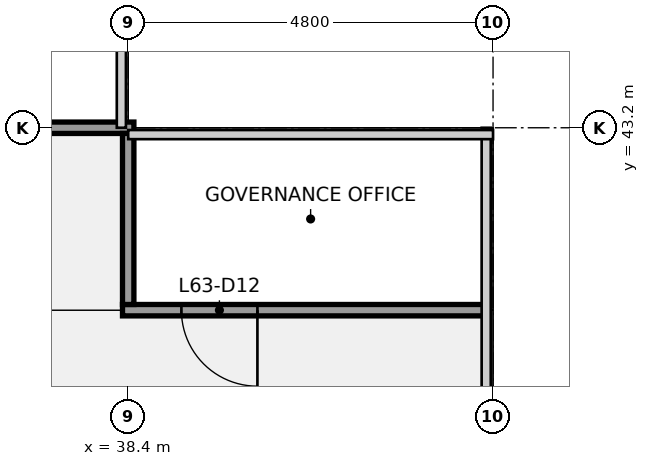
"""IFC4 building model, lengths in metres.
Left out: names, types, materials, properties, quantities, classifications, styles, units other than length and angle.
Written with IfcOpenShell. Run it as: python <this file> out.ifc"""

import sys

from ifc_helpers import new_model, si_unit, direction, frame, frame_2d, origin, place, context, subcontext, project, spatial, rectangle, extrude, element, fill, save


model = new_model("IFC4")
c1 = context("Model", 3, precision=1e-05, world=origin(), true_north=direction((0.0, 1.0)))
c2 = subcontext(c1, "Body", "Model", "MODEL_VIEW")
j1 = project(units=[si_unit("LENGTHUNIT", "METRE"), si_unit("PLANEANGLEUNIT", "RADIAN")], contexts=[c1])
p1 = place(None, origin())
s1 = spatial("IfcSite", under=j1, at=p1, CompositionType="ELEMENT")
p2 = place(p1, origin())
s2 = spatial("IfcBuilding", under=s1, at=p2, CompositionType="ELEMENT")
p3 = place(p2, frame((0.0, 0.0, 290.3)))
s3 = spatial("IfcBuildingStorey", under=s2, at=p3, CompositionType="ELEMENT", Elevation=290.3)
p4 = place(p3, frame((38.325, 40.8, 0.0), z_axis=(0.0, 0.0, 1.0), x_axis=(1.0, 0.0, 0.0)))
e1 = element("IfcWall", 1, at=p4, inside=s3, PredefinedType="PARTITIONING", context=c2, shape_type="SweptSolid", body=[
    extrude(rectangle(XDim=4.775, YDim=0.15, at=frame_2d((2.388, 0.0))), origin(), (0.0, 0.0, 1.0), 2.87),
])
p5 = place(p4, frame((0.775, 0.0, 0.0)))
e2 = element("IfcOpeningElement", 2, at=p5, cuts=e1, PredefinedType="OPENING", context=c2, shape_type="SweptSolid", body=[
    extrude(rectangle(XDim=1.0, YDim=2.1, at=frame_2d((0.5, 1.05))), frame((0.0, 0.085, 0.0), z_axis=(0.0, -1.0, 0.0), x_axis=(1.0, 0.0, 0.0)), (0.0, 0.0, 1.0), 0.17),
])
p6 = place(p3, frame((19.125, 43.2, 0.0), z_axis=(0.0, 0.0, 1.0), x_axis=(1.0, 0.0, 0.0)))
e3 = element("IfcWall", 3, at=p6, inside=s3, PredefinedType="PARTITIONING", context=c2, shape_type="SweptSolid", body=[
    extrude(rectangle(XDim=19.35, YDim=0.15, at=frame_2d((9.675, 0.0))), origin(), (0.0, 0.0, 1.0), 2.87),
])
p7 = place(p6, frame((0.775, 0.0, 0.0)))
e4 = element("IfcOpeningElement", 4, at=p7, cuts=e3, PredefinedType="OPENING", context=c2, shape_type="SweptSolid", body=[
    extrude(rectangle(XDim=1.0, YDim=2.1, at=frame_2d((0.5, 1.05))), frame((0.0, 0.085, 0.0), z_axis=(0.0, -1.0, 0.0), x_axis=(1.0, 0.0, 0.0)), (0.0, 0.0, 1.0), 0.17),
])
p8 = place(p6, frame((4.375, 0.0, 0.0)))
e5 = element("IfcOpeningElement", 5, at=p8, cuts=e3, PredefinedType="OPENING", context=c2, shape_type="SweptSolid", body=[
    extrude(rectangle(XDim=1.0, YDim=2.1, at=frame_2d((0.5, 1.05))), frame((0.0, 0.085, 0.0), z_axis=(0.0, -1.0, 0.0), x_axis=(1.0, 0.0, 0.0)), (0.0, 0.0, 1.0), 0.17),
])
p9 = place(p6, frame((12.775, 0.0, 0.0)))
e6 = element("IfcOpeningElement", 6, at=p9, cuts=e3, PredefinedType="OPENING", context=c2, shape_type="SweptSolid", body=[
    extrude(rectangle(XDim=1.0, YDim=2.1, at=frame_2d((0.5, 1.05))), frame((0.0, 0.085, 0.0), z_axis=(0.0, -1.0, 0.0), x_axis=(1.0, 0.0, 0.0)), (0.0, 0.0, 1.0), 0.17),
])
p10 = place(p3, frame((38.4, 40.875, 0.0), z_axis=(0.0, 0.0, 1.0), x_axis=(0.0, 1.0, 0.0)))
e7 = element("IfcWall", 7, at=p10, inside=s3, PredefinedType="PARTITIONING", context=c2, shape_type="SweptSolid", body=[
    extrude(rectangle(XDim=2.25, YDim=0.15, at=frame_2d((1.125, 0.0))), origin(), (0.0, 0.0, 1.0), 2.87),
])
p11 = place(p5, origin())
e8 = element("IfcDoor", 8, at=p11, inside=s3, OperationType="SINGLE_SWING_RIGHT", PredefinedType="DOOR", context=c2, shape_type="SweptSolid", body=[
    extrude(rectangle(XDim=1.0, YDim=2.1, at=frame_2d((0.5, 1.05))), frame((0.0, 0.025, 0.0), z_axis=(0.0, -1.0, 0.0), x_axis=(1.0, 0.0, 0.0)), (0.0, 0.0, 1.0), 0.05),
])
fill(e2, e8)
save(model, sys.argv[1])
